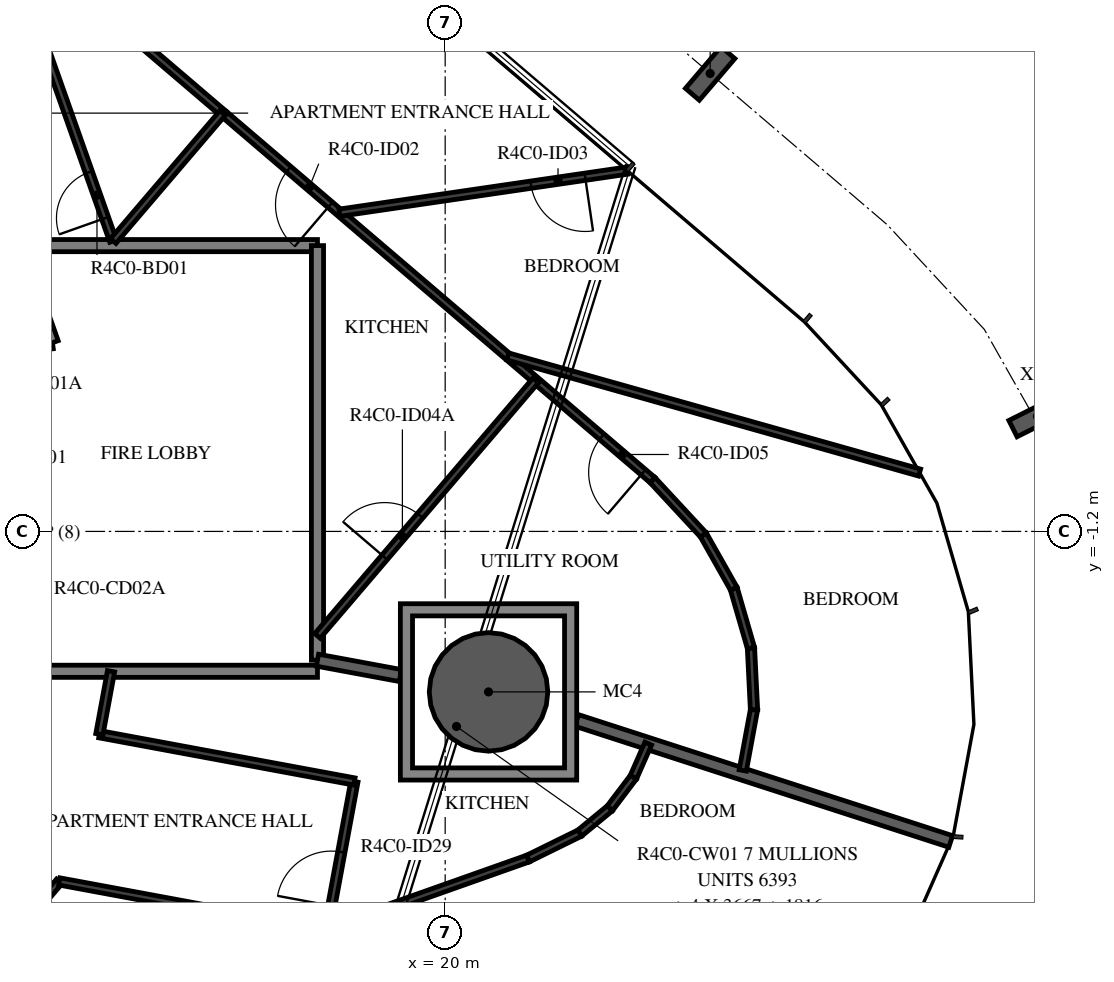
"""IFC4 building model, lengths in metres.
Left out: names, types, materials, properties, quantities, classifications, styles, units other than length and angle.
Written with IfcOpenShell. Run it as: python <this file> out.ifc"""

import sys

from ifc_helpers import new_model, si_unit, direction, frame, frame_2d, origin, origin_2d, place, context, subcontext, project, spatial, polyline, rectangle, hollow_circle, i_section, outline, extrude, element, fill, save


model = new_model("IFC4")
c1 = context("Model", 3, precision=1e-05, world=origin(), true_north=direction((0.0, 1.0)))
c2 = subcontext(c1, "Body", "Model", "MODEL_VIEW")
j1 = project(units=[si_unit("LENGTHUNIT", "METRE"), si_unit("PLANEANGLEUNIT", "RADIAN")], contexts=[c1])
p1 = place(None, origin())
s1 = spatial("IfcSite", under=j1, at=p1, CompositionType="ELEMENT")
p2 = place(p1, origin())
s2 = spatial("IfcBuilding", under=s1, at=p2, CompositionType="ELEMENT")
p3 = place(p2, frame((0.0, 0.0, 179.7)))
s3 = spatial("IfcBuildingStorey", under=s2, at=p3, CompositionType="ELEMENT", Elevation=179.7)
p4 = place(p3, frame((20.713, -3.839, -0.38), z_axis=(0.0, 0.0, 1.0), x_axis=(1.0, 0.0, 0.0)))
e1 = element("IfcColumn", 1, at=p4, inside=s3, PredefinedType="COLUMN", context=c2, shape_type="SweptSolid", body=[
    extrude(hollow_circle(Radius=0.975, WallThickness=0.045, at=origin_2d()), origin(), (0.0, 0.0, 1.0), 2.616),
])
for number, where, z_axis, x_axis in (
    (2, (29.74, 0.692, -0.38), (0.0, 0.0, 1.0), (0.449, -0.894, 0.0)),
    (3, (24.358, 6.331, -0.38), (0.0, 0.0, 1.0), (0.76, -0.649, 0.0)),
):
    element("IfcColumn", number, at=place(p3, frame(where, z_axis=z_axis, x_axis=x_axis)), inside=s3, PredefinedType="COLUMN", context=c2, shape_type="SweptSolid", body=[
        extrude(i_section(OverallWidth=0.3, OverallDepth=0.9, WebThickness=0.019, FlangeThickness=0.035, FilletRadius=0.03, at=origin_2d()), origin(), (0.0, 0.0, 1.0), 2.616),
    ])
p5 = place(p3, frame((11.87, 1.668, 0.0), z_axis=(0.0, 0.0, 1.0), x_axis=(0.990270910415, 0.139152879904, 0.0)))
e4 = element("IfcWall", 4, at=p5, inside=s3, PredefinedType="STANDARD", context=c2, shape_type="SweptSolid", body=[
    extrude(rectangle(XDim=1.688, YDim=0.2, at=frame_2d((0.844, 0.0))), origin(), (0.0, 0.0, 1.0), 3.05),
])
p6 = place(p5, frame((0.11, 0.0, 0.0)))
e5 = element("IfcOpeningElement", 5, at=p6, cuts=e4, PredefinedType="OPENING", context=c2, shape_type="SweptSolid", body=[
    extrude(rectangle(XDim=1.2, YDim=2.0, at=frame_2d((0.6, 1.0))), frame((0.0, 0.11, 0.0), z_axis=(0.0, -1.0, 0.0), x_axis=(1.0, 0.0, 0.0)), (0.0, 0.0, 1.0), 0.22),
])
p7 = place(p3, frame((13.542, 1.903, 0.0), z_axis=(0.0, 0.0, 1.0), x_axis=(-0.333808508206, 0.942640907159, 0.0)))
e6 = element("IfcWall", 6, at=p7, inside=s3, PredefinedType="STANDARD", context=c2, shape_type="SweptSolid", body=[
    extrude(rectangle(XDim=6.317, YDim=0.2, at=frame_2d((3.158, 0.0))), origin(), (0.0, 0.0, 1.0), 3.05),
])
p8 = place(p3, frame((17.9, 3.5, 0.0), z_axis=(0.0, 0.0, 1.0), x_axis=(-1.0, 0.0, 0.0)))
e7 = element("IfcWall", 7, at=p8, inside=s3, PredefinedType="STANDARD", context=c2, shape_type="SweptSolid", body=[
    extrude(rectangle(XDim=4.924, YDim=0.2, at=frame_2d((2.462, 0.0))), origin(), (0.0, 0.0, 1.0), 3.05),
])
p9 = place(p3, frame((17.9, -3.318, 0.0), z_axis=(0.0, 0.0, 1.0), x_axis=(0.0, 1.0, 0.0)))
e8 = element("IfcWall", 8, at=p9, inside=s3, PredefinedType="STANDARD", context=c2, shape_type="SweptSolid", body=[
    extrude(rectangle(XDim=6.818, YDim=0.2, at=frame_2d((3.409, 0.0))), origin(), (0.0, 0.0, 1.0), 3.05),
])
p10 = place(p3, frame((12.979, -3.5, 0.0), z_axis=(0.0, 0.0, 1.0), x_axis=(1.0, 0.0, 0.0)))
e9 = element("IfcWall", 9, at=p10, inside=s3, PredefinedType="STANDARD", context=c2, shape_type="SweptSolid", body=[
    extrude(rectangle(XDim=4.92, YDim=0.2, at=frame_2d((2.46, 0.0))), origin(), (0.0, 0.0, 1.0), 3.05),
])
p11 = place(p3, frame((22.163, -4.308, 0.0), z_axis=(0.0, 0.0, 1.0), x_axis=(0.951422718769, -0.307887658426, 0.0)))
e10 = element("IfcWall", 10, at=p11, inside=s3, PredefinedType="STANDARD", context=c2, shape_type="SweptSolid", body=[
    extrude(rectangle(XDim=6.464, YDim=0.2, at=frame_2d((3.232, 0.0))), origin(), (0.0, 0.0, 1.0), 3.05),
])
p12 = place(p3, frame((17.9, -3.318, 0.0), z_axis=(0.0, 0.0, 1.0), x_axis=(0.983252800712, -0.182246892682, 0.0)))
e11 = element("IfcWall", 11, at=p12, inside=s3, PredefinedType="STANDARD", context=c2, shape_type="SweptSolid", body=[
    extrude(rectangle(XDim=1.386, YDim=0.2, at=frame_2d((0.693, 0.0))), origin(), (0.0, 0.0, 1.0), 3.05),
])
p13 = place(p3, frame((14.541, 3.575, 0.0), z_axis=(0.0, 0.0, 1.0), x_axis=(-0.333799280318, 0.942644174893, 0.0)))
e12 = element("IfcWall", 12, at=p13, inside=s3, PredefinedType="PARTITIONING", context=c2, shape_type="SweptSolid", body=[
    extrude(rectangle(XDim=5.477, YDim=0.12, at=frame_2d((2.738, 0.0))), origin(), (0.0, 0.0, 1.0), 3.05),
])
p14 = place(p13, frame((0.4, 0.0, 0.0)))
e13 = element("IfcOpeningElement", 13, at=p14, cuts=e12, PredefinedType="OPENING", context=c2, shape_type="SweptSolid", body=[
    extrude(rectangle(XDim=0.8, YDim=2.1, at=frame_2d((0.4, 1.05))), frame((0.0, 0.07, 0.0), z_axis=(0.0, -1.0, 0.0), x_axis=(1.0, 0.0, 0.0)), (0.0, 0.0, 1.0), 0.14),
])
p15 = place(p3, frame((12.734, 8.762, 0.0), z_axis=(0.0, 0.0, 1.0), x_axis=(0.760390484255, -0.649466174219, 0.0)))
e14 = element("IfcWall", 14, at=p15, inside=s3, PredefinedType="PARTITIONING", context=c2, shape_type="SweptSolid", body=[
    extrude(rectangle(XDim=4.783, YDim=0.12, at=frame_2d((2.391, 0.0))), origin(), (0.0, 0.0, 1.0), 3.05),
])
p16 = place(p3, frame((23.411, -0.357, 0.0), z_axis=(0.0, 0.0, 1.0), x_axis=(-0.76041871148, 0.649433124525, 0.0)))
e15 = element("IfcWall", 15, at=p16, inside=s3, PredefinedType="PARTITIONING", context=c2, shape_type="SweptSolid", body=[
    extrude(rectangle(XDim=9.259, YDim=0.12, at=frame_2d((4.629, 0.0))), origin(), (0.0, 0.0, 1.0), 3.05),
])
p17 = place(p16, frame((6.972, 0.0, 0.0)))
e16 = element("IfcOpeningElement", 16, at=p17, cuts=e15, PredefinedType="OPENING", context=c2, shape_type="SweptSolid", body=[
    extrude(rectangle(XDim=0.9, YDim=2.1, at=frame_2d((0.45, 1.05))), frame((0.0, 0.07, 0.0), z_axis=(0.0, -1.0, 0.0), x_axis=(1.0, 0.0, 0.0)), (0.0, 0.0, 1.0), 0.14),
])
p18 = place(p16, frame((0.2, 0.0, 0.0)))
e17 = element("IfcOpeningElement", 17, at=p18, cuts=e15, PredefinedType="OPENING", context=c2, shape_type="SweptSolid", body=[
    extrude(rectangle(XDim=0.9, YDim=2.1, at=frame_2d((0.45, 1.05))), frame((0.0, 0.07, 0.0), z_axis=(0.0, -1.0, 0.0), x_axis=(1.0, 0.0, 0.0)), (0.0, 0.0, 1.0), 0.14),
])
p19 = place(p3, frame((16.341, 5.682, 0.0), z_axis=(0.0, 0.0, 1.0), x_axis=(-0.64946993237, -0.76038727432, 0.0)))
e18 = element("IfcWall", 18, at=p19, inside=s3, PredefinedType="PARTITIONING", context=c2, shape_type="SweptSolid", body=[
    extrude(rectangle(XDim=2.771, YDim=0.12, at=frame_2d((1.386, 0.0))), origin(), (0.0, 0.0, 1.0), 3.05),
])
p20 = place(p3, frame((17.9, -2.918, 0.0), z_axis=(0.0, 0.0, 1.0), x_axis=(0.649469887983, 0.760387312232, 0.0)))
e19 = element("IfcWall", 19, at=p20, inside=s3, PredefinedType="PARTITIONING", context=c2, shape_type="SweptSolid", body=[
    extrude(rectangle(XDim=5.527, YDim=0.12, at=frame_2d((2.763, 0.0))), origin(), (0.0, 0.0, 1.0), 3.05),
])
p21 = place(p20, frame((1.7, 0.0, 0.0)))
e20 = element("IfcOpeningElement", 20, at=p21, cuts=e19, PredefinedType="OPENING", context=c2, shape_type="SweptSolid", body=[
    extrude(rectangle(XDim=0.9, YDim=2.0, at=frame_2d((0.45, 1.0))), frame((0.0, 0.07, 0.0), z_axis=(0.0, -1.0, 0.0), x_axis=(1.0, 0.0, 0.0)), (0.0, 0.0, 1.0), 0.14),
])
p22 = place(p3, frame((22.994, 4.734, 0.0), z_axis=(0.0, 0.0, 1.0), x_axis=(-0.989449286977, -0.144879634529, 0.0)))
e21 = element("IfcWall", 21, at=p22, inside=s3, PredefinedType="PARTITIONING", context=c2, shape_type="SweptSolid", body=[
    extrude(rectangle(XDim=4.782, YDim=0.12, at=frame_2d((2.391, 0.0))), origin(), (0.0, 0.0, 1.0), 3.05),
])
p23 = place(p22, frame((0.7, 0.0, 0.0)))
e22 = element("IfcOpeningElement", 22, at=p23, cuts=e21, PredefinedType="OPENING", context=c2, shape_type="SweptSolid", body=[
    extrude(rectangle(XDim=0.9, YDim=2.1, at=frame_2d((0.45, 1.05))), frame((0.0, 0.07, 0.0), z_axis=(0.0, -1.0, 0.0), x_axis=(1.0, 0.0, 0.0)), (0.0, 0.0, 1.0), 0.14),
])
p24 = place(p3, frame((21.029, 1.677, 0.0), z_axis=(0.0, 0.0, 1.0), x_axis=(0.962458274539, -0.271429677396, 0.0)))
e23 = element("IfcWall", 23, at=p24, inside=s3, PredefinedType="PARTITIONING", context=c2, shape_type="SweptSolid", body=[
    extrude(rectangle(XDim=7.037, YDim=0.12, at=frame_2d((3.519, 0.0))), origin(), (0.0, 0.0, 1.0), 3.05),
])
for number, where, z_axis, x_axis in (
    (24, (24.894, -5.131, 0.0), (0.0, 0.0, 1.0), (0.182, 0.983, 0.0)),
    (25, (25.079, -4.132, 0.0), (0.0, 0.0, 1.0), (-0.049, 0.999, 0.0)),
):
    element("IfcWall", number, at=place(p3, frame(where, z_axis=z_axis, x_axis=x_axis)), inside=s3, PredefinedType="PARTITIONING", context=c2, shape_type="SweptSolid", body=[
        extrude(rectangle(XDim=1.016, YDim=0.12, at=frame_2d((0.508, 0.0))), origin(), (0.0, 0.0, 1.0), 3.05),
    ])
for number, where, z_axis, x_axis in (
    (26, (25.029, -3.117, 0.0), (0.0, 0.0, 1.0), (-0.279, 0.96, 0.0)),
    (27, (24.746, -2.141, 0.0), (0.0, 0.0, 1.0), (-0.492, 0.87, 0.0)),
):
    element("IfcWall", number, at=place(p3, frame(where, z_axis=z_axis, x_axis=x_axis)), inside=s3, PredefinedType="PARTITIONING", context=c2, shape_type="SweptSolid", body=[
        extrude(rectangle(XDim=1.016, YDim=0.12, at=frame_2d((0.508, 0.0))), origin(), (0.0, 0.0, 1.0), 3.05),
    ])
p25 = place(p3, frame((24.246, -1.257, 0.0), z_axis=(0.0, 0.0, 1.0), x_axis=(-0.679840361176, 0.733360132074, 0.0)))
e28 = element("IfcWall", 28, at=p25, inside=s3, PredefinedType="PARTITIONING", context=c2, shape_type="SweptSolid", body=[
    extrude(rectangle(XDim=1.227, YDim=0.12, at=frame_2d((0.614, 0.0))), origin(), (0.0, 0.0, 1.0), 3.05),
])
p26 = place(p3, frame((8.737, -12.713, 0.0), z_axis=(0.0, 0.0, 1.0), x_axis=(0.649427973074, 0.760423111031, 0.0)))
e29 = element("IfcWall", 29, at=p26, inside=s3, PredefinedType="PARTITIONING", context=c2, shape_type="SweptSolid", body=[
    extrude(rectangle(XDim=7.571, YDim=0.12, at=frame_2d((3.785, 0.0))), origin(), (0.0, 0.0, 1.0), 3.05),
])
p27 = place(p26, frame((0.2, 0.0, 0.0)))
e30 = element("IfcOpeningElement", 30, at=p27, cuts=e29, PredefinedType="OPENING", context=c2, shape_type="SweptSolid", body=[
    extrude(rectangle(XDim=0.9, YDim=2.1, at=frame_2d((0.45, 1.05))), frame((0.0, 0.07, 0.0), z_axis=(0.0, -1.0, 0.0), x_axis=(1.0, 0.0, 0.0)), (0.0, 0.0, 1.0), 0.14),
])
p28 = place(p26, frame((4.634, 0.0, 0.0)))
e31 = element("IfcOpeningElement", 31, at=p28, cuts=e29, PredefinedType="OPENING", context=c2, shape_type="SweptSolid", body=[
    extrude(rectangle(XDim=0.8, YDim=2.1, at=frame_2d((0.4, 1.05))), frame((0.0, 0.07, 0.0), z_axis=(0.0, -1.0, 0.0), x_axis=(1.0, 0.0, 0.0)), (0.0, 0.0, 1.0), 0.14),
])
p29 = place(p3, frame((13.654, -6.956, 0.0), z_axis=(0.0, 0.0, 1.0), x_axis=(0.983253166233, -0.18224492062, 0.0)))
e32 = element("IfcWall", 32, at=p29, inside=s3, PredefinedType="PARTITIONING", context=c2, shape_type="SweptSolid", body=[
    extrude(rectangle(XDim=4.437, YDim=0.12, at=frame_2d((2.218, 0.0))), origin(), (0.0, 0.0, 1.0), 3.05),
])
p30 = place(p3, frame((18.055, -7.75, 0.0), z_axis=(0.0, 0.0, 1.0), x_axis=(0.18225497314, 0.983251302957, 0.0)))
e33 = element("IfcWall", 33, at=p30, inside=s3, PredefinedType="PARTITIONING", context=c2, shape_type="SweptSolid", body=[
    extrude(rectangle(XDim=2.479, YDim=0.12, at=frame_2d((1.24, 0.0))), origin(), (0.0, 0.0, 1.0), 3.05),
])
p31 = place(p30, frame((0.4, 0.0, 0.0)))
e34 = element("IfcOpeningElement", 34, at=p31, cuts=e33, PredefinedType="OPENING", context=c2, shape_type="SweptSolid", body=[
    extrude(rectangle(XDim=0.9, YDim=2.1, at=frame_2d((0.45, 1.05))), frame((0.0, 0.07, 0.0), z_axis=(0.0, -1.0, 0.0), x_axis=(1.0, 0.0, 0.0)), (0.0, 0.0, 1.0), 0.14),
])
p32 = place(p3, frame((18.507, -5.312, 0.0), z_axis=(0.0, 0.0, 1.0), x_axis=(-0.983254286603, 0.182238875868, 0.0)))
e35 = element("IfcWall", 35, at=p32, inside=s3, PredefinedType="PARTITIONING", context=c2, shape_type="SweptSolid", body=[
    extrude(rectangle(XDim=4.266, YDim=0.12, at=frame_2d((2.133, 0.0))), origin(), (0.0, 0.0, 1.0), 3.05),
])
p33 = place(p3, frame((14.313, -4.535, 0.0), z_axis=(0.0, 0.0, 1.0), x_axis=(0.182271946033, 0.983248156718, 0.0)))
e36 = element("IfcWall", 36, at=p33, inside=s3, PredefinedType="PARTITIONING", context=c2, shape_type="SweptSolid", body=[
    extrude(rectangle(XDim=1.053, YDim=0.12, at=frame_2d((0.526, 0.0))), origin(), (0.0, 0.0, 1.0), 3.05),
])
p34 = place(p3, frame((21.362, -6.58, 0.0), z_axis=(0.0, 0.0, 1.0), x_axis=(-0.942647598157, -0.333789612913, 0.0)))
e37 = element("IfcWall", 37, at=p34, inside=s3, PredefinedType="PARTITIONING", context=c2, shape_type="SweptSolid", body=[
    extrude(rectangle(XDim=11.234, YDim=0.12, at=frame_2d((5.617, 0.0))), origin(), (0.0, 0.0, 1.0), 3.05),
])
p35 = place(p3, frame((23.34, -4.689, 0.0), z_axis=(0.0, 0.0, 1.0), x_axis=(-0.404077449371, -0.914724775498, 0.0)))
e38 = element("IfcWall", 38, at=p35, inside=s3, PredefinedType="PARTITIONING", context=c2, shape_type="SweptSolid", body=[
    extrude(rectangle(XDim=0.605, YDim=0.12, at=frame_2d((0.302, 0.0))), origin(), (0.0, 0.0, 1.0), 3.05),
])
for number, where, z_axis, x_axis in (
    (39, (23.095, -5.242, 0.0), (0.0, 0.0, 1.0), (-0.604, -0.797, 0.0)),
    (40, (22.708, -5.754, 0.0), (0.0, 0.0, 1.0), (-0.772, -0.636, 0.0)),
):
    element("IfcWall", number, at=place(p3, frame(where, z_axis=z_axis, x_axis=x_axis)), inside=s3, PredefinedType="PARTITIONING", context=c2, shape_type="SweptSolid", body=[
        extrude(rectangle(XDim=0.642, YDim=0.12, at=frame_2d((0.321, 0.0))), origin(), (0.0, 0.0, 1.0), 3.05),
    ])
p36 = place(p3, frame((22.212, -6.162, 0.0), z_axis=(0.0, 0.0, 1.0), x_axis=(-0.897448694974, -0.441118850072, 0.0)))
e41 = element("IfcWall", 41, at=p36, inside=s3, PredefinedType="PARTITIONING", context=c2, shape_type="SweptSolid", body=[
    extrude(rectangle(XDim=0.947, YDim=0.12, at=frame_2d((0.474, 0.0))), origin(), (0.0, 0.0, 1.0), 3.05),
])
p37 = place(p3, origin())
e42 = element("IfcWall", 42, at=p37, inside=s3, PredefinedType="STANDARD", context=c2, shape_type="SweptSolid", body=[
    extrude(outline(polyline([(22.163, -2.389), (22.163, -5.289), (19.263, -5.289), (19.263, -2.389), (22.163, -2.389)]), holes=[polyline([(19.463, -5.089), (21.963, -5.089), (21.963, -2.589), (19.463, -2.589), (19.463, -5.089)])]), origin(), (0.0, 0.0, 1.0), 3.05),
])
p38 = place(p14, origin())
e43 = element("IfcDoor", 43, at=p38, inside=s3, OperationType="SINGLE_SWING_LEFT", PredefinedType="DOOR", context=c2, shape_type="SweptSolid", body=[
    extrude(rectangle(XDim=0.8, YDim=2.1, at=frame_2d((0.4, 1.05))), frame((0.0, 0.025, 0.0), z_axis=(0.0, -1.0, 0.0), x_axis=(1.0, 0.0, 0.0)), (0.0, 0.0, 1.0), 0.05),
])
fill(e13, e43)
p39 = place(p17, origin())
e44 = element("IfcDoor", 44, at=p39, inside=s3, OperationType="SINGLE_SWING_RIGHT", PredefinedType="DOOR", context=c2, shape_type="SweptSolid", body=[
    extrude(rectangle(XDim=0.9, YDim=2.1, at=frame_2d((0.45, 1.05))), frame((0.0, 0.025, 0.0), z_axis=(0.0, -1.0, 0.0), x_axis=(1.0, 0.0, 0.0)), (0.0, 0.0, 1.0), 0.05),
])
fill(e16, e44)
p40 = place(p23, origin())
e45 = element("IfcDoor", 45, at=p40, inside=s3, OperationType="SINGLE_SWING_LEFT", PredefinedType="DOOR", context=c2, shape_type="SweptSolid", body=[
    extrude(rectangle(XDim=0.9, YDim=2.1, at=frame_2d((0.45, 1.05))), frame((0.0, 0.025, 0.0), z_axis=(0.0, -1.0, 0.0), x_axis=(1.0, 0.0, 0.0)), (0.0, 0.0, 1.0), 0.05),
])
fill(e22, e45)
p41 = place(p21, origin())
e46 = element("IfcDoor", 46, at=p41, inside=s3, OperationType="SINGLE_SWING_LEFT", PredefinedType="DOOR", context=c2, shape_type="SweptSolid", body=[
    extrude(rectangle(XDim=0.9, YDim=2.0, at=frame_2d((0.45, 1.0))), frame((0.0, 0.025, 0.0), z_axis=(0.0, -1.0, 0.0), x_axis=(1.0, 0.0, 0.0)), (0.0, 0.0, 1.0), 0.05),
])
fill(e20, e46)
p42 = place(p18, origin())
e47 = element("IfcDoor", 47, at=p42, inside=s3, OperationType="SINGLE_SWING_LEFT", PredefinedType="DOOR", context=c2, shape_type="SweptSolid", body=[
    extrude(rectangle(XDim=0.9, YDim=2.1, at=frame_2d((0.45, 1.05))), frame((0.0, 0.025, 0.0), z_axis=(0.0, -1.0, 0.0), x_axis=(1.0, 0.0, 0.0)), (0.0, 0.0, 1.0), 0.05),
])
fill(e17, e47)
p43 = place(p31, origin())
e48 = element("IfcDoor", 48, at=p43, inside=s3, OperationType="SINGLE_SWING_RIGHT", PredefinedType="DOOR", context=c2, shape_type="SweptSolid", body=[
    extrude(rectangle(XDim=0.9, YDim=2.1, at=frame_2d((0.45, 1.05))), frame((0.0, 0.025, 0.0), z_axis=(0.0, -1.0, 0.0), x_axis=(1.0, 0.0, 0.0)), (0.0, 0.0, 1.0), 0.05),
])
fill(e34, e48)
save(model, sys.argv[1])
